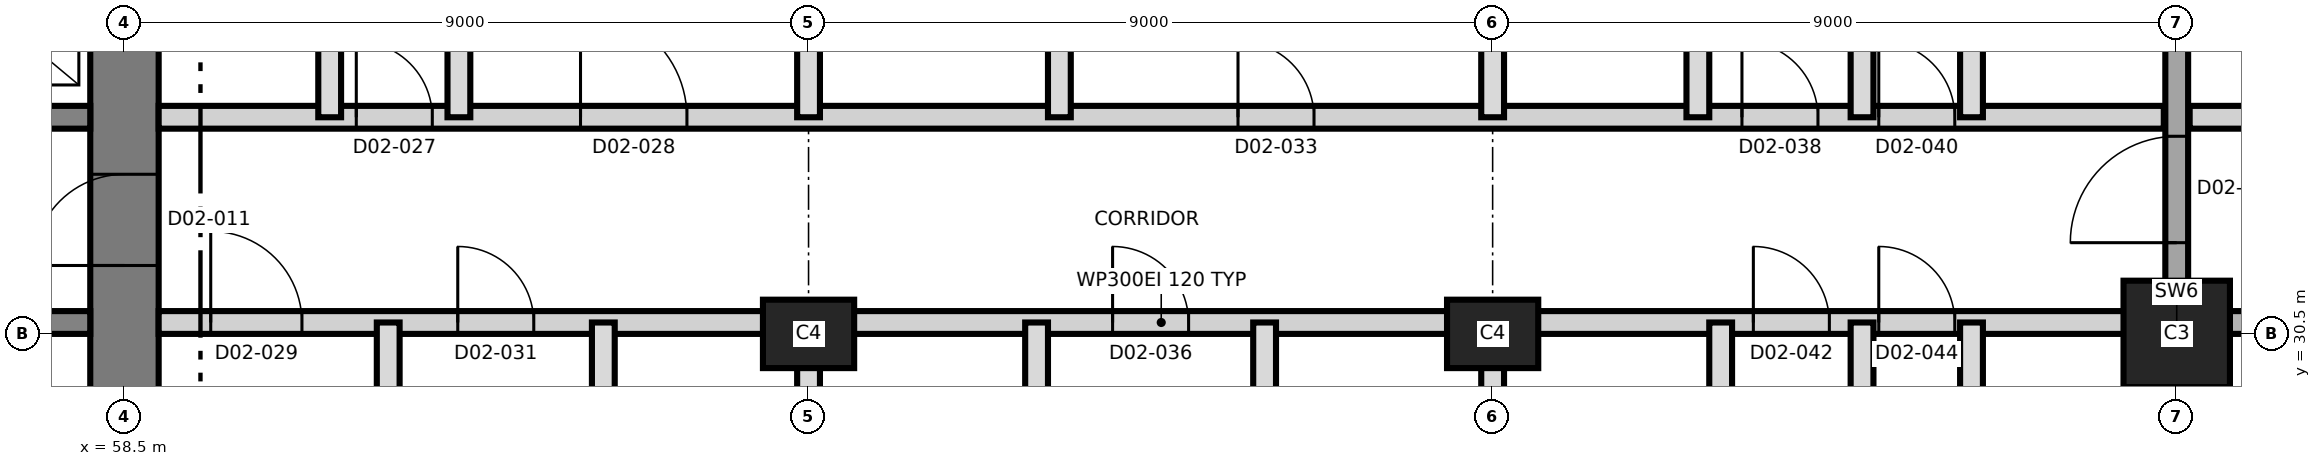
"""IFC4 building model, lengths in metres.
Left out: names, types, materials, properties, quantities, classifications, styles, units other than length and angle.
Written with IfcOpenShell. Run it as: python <this file> out.ifc"""

import sys

from ifc_helpers import new_model, si_unit, direction, frame, frame_2d, origin, origin_2d, place, context, subcontext, project, spatial, rectangle, extrude, element, fill, save


model = new_model("IFC4")
c1 = context("Model", 3, precision=1e-05, world=origin(), true_north=direction((0.0, 1.0)))
c2 = subcontext(c1, "Body", "Model", "MODEL_VIEW")
j1 = project(units=[si_unit("LENGTHUNIT", "METRE"), si_unit("PLANEANGLEUNIT", "RADIAN")], contexts=[c1])
p1 = place(None, origin())
s1 = spatial("IfcSite", under=j1, at=p1, CompositionType="ELEMENT")
p2 = place(p1, origin())
s2 = spatial("IfcBuilding", under=s1, at=p2, CompositionType="ELEMENT")
p3 = place(p2, frame((0.0, 0.0, 48.3)))
s3 = spatial("IfcBuildingStorey", under=s2, at=p3, CompositionType="ELEMENT", Elevation=48.3)
p4 = place(p3, frame((58.5, 21.05, 0.0), z_axis=(0.0, 0.0, 1.0), x_axis=(0.0, 1.0, 0.0)))
e1 = element("IfcWall", 1, at=p4, inside=s3, PredefinedType="SHEAR", context=c2, shape_type="SweptSolid", body=[
    extrude(rectangle(XDim=18.9, YDim=0.9, at=frame_2d((9.45, 0.0))), origin(), (0.0, 0.0, 1.0), 3.7),
])
p5 = place(p4, frame((10.35, 0.0, 0.0)))
e2 = element("IfcOpeningElement", 2, at=p5, cuts=e1, PredefinedType="OPENING", context=c2, shape_type="SweptSolid", body=[
    extrude(rectangle(XDim=1.2, YDim=2.1, at=frame_2d((0.6, 1.05))), frame((0.0, 0.46, 0.0), z_axis=(0.0, -1.0, 0.0), x_axis=(1.0, 0.0, 0.0)), (0.0, 0.0, 1.0), 0.92),
])
p6 = place(p3, frame((31.95, 30.65, 0.0), z_axis=(0.0, 0.0, 1.0), x_axis=(1.0, 0.0, 0.0)))
e3 = element("IfcWall", 3, at=p6, inside=s3, PredefinedType="SHEAR", context=c2, shape_type="SweptSolid", body=[
    extrude(rectangle(XDim=26.1, YDim=0.3, at=frame_2d((13.05, 0.0))), origin(), (0.0, 0.0, 1.0), 3.7),
])
p7 = place(p6, frame((24.55, 0.0, 0.0)))
e4 = element("IfcOpeningElement", 4, at=p7, cuts=e3, PredefinedType="OPENING", context=c2, shape_type="SweptSolid", body=[
    extrude(rectangle(XDim=1.0, YDim=2.1, at=frame_2d((0.5, 1.05))), frame((0.0, 0.16, 0.0), z_axis=(0.0, -1.0, 0.0), x_axis=(1.0, 0.0, 0.0)), (0.0, 0.0, 1.0), 0.32),
])
p8 = place(p6, frame((11.35, 0.0, 0.0)))
e5 = element("IfcOpeningElement", 5, at=p8, cuts=e3, PredefinedType="OPENING", context=c2, shape_type="SweptSolid", body=[
    extrude(rectangle(XDim=1.0, YDim=2.1, at=frame_2d((0.5, 1.05))), frame((0.0, 0.16, 0.0), z_axis=(0.0, -1.0, 0.0), x_axis=(1.0, 0.0, 0.0)), (0.0, 0.0, 1.0), 0.32),
])
p9 = place(p3, frame((31.95, 33.35, 0.0), z_axis=(0.0, 0.0, 1.0), x_axis=(1.0, 0.0, 0.0)))
e6 = element("IfcWall", 6, at=p9, inside=s3, PredefinedType="SHEAR", context=c2, shape_type="SweptSolid", body=[
    extrude(rectangle(XDim=26.1, YDim=0.3, at=frame_2d((13.05, 0.0))), origin(), (0.0, 0.0, 1.0), 3.7),
])
p10 = place(p9, frame((13.7, 0.0, 0.0)))
e7 = element("IfcOpeningElement", 7, at=p10, cuts=e6, PredefinedType="OPENING", context=c2, shape_type="SweptSolid", body=[
    extrude(rectangle(XDim=1.4, YDim=2.1, at=frame_2d((0.7, 1.05))), frame((0.0, 0.16, 0.0), z_axis=(0.0, -1.0, 0.0), x_axis=(1.0, 0.0, 0.0)), (0.0, 0.0, 1.0), 0.32),
])
p11 = place(p9, frame((5.175, 0.0, 0.0)))
e8 = element("IfcOpeningElement", 8, at=p11, cuts=e6, PredefinedType="OPENING", context=c2, shape_type="SweptSolid", body=[
    extrude(rectangle(XDim=1.2, YDim=2.1, at=frame_2d((0.6, 1.05))), frame((0.0, 0.16, 0.0), z_axis=(0.0, -1.0, 0.0), x_axis=(1.0, 0.0, 0.0)), (0.0, 0.0, 1.0), 0.32),
])
p12 = place(p9, frame((19.725, 0.0, 0.0)))
e9 = element("IfcOpeningElement", 9, at=p12, cuts=e6, PredefinedType="OPENING", context=c2, shape_type="SweptSolid", body=[
    extrude(rectangle(XDim=1.2, YDim=2.1, at=frame_2d((0.6, 1.05))), frame((0.0, 0.16, 0.0), z_axis=(0.0, -1.0, 0.0), x_axis=(1.0, 0.0, 0.0)), (0.0, 0.0, 1.0), 0.32),
])
for number, where, z_axis, x_axis in (
    (10, (67.5, 30.5, 0.0), (0.0, 0.0, 1.0), (1.0, 0.0, 0.0)),
    (11, (76.5, 30.5, 0.0), (0.0, 0.0, 1.0), (1.0, 0.0, 0.0)),
):
    element("IfcColumn", number, at=place(p3, frame(where, z_axis=z_axis, x_axis=x_axis)), inside=s3, PredefinedType="COLUMN", context=c2, shape_type="SweptSolid", body=[
        extrude(rectangle(XDim=1.2, YDim=0.9, at=origin_2d()), origin(), (0.0, 0.0, 1.0), 3.7),
    ])
p13 = place(p3, frame((85.5, 30.5, 0.0), z_axis=(0.0, 0.0, 1.0), x_axis=(1.0, 0.0, 0.0)))
e12 = element("IfcColumn", 12, at=p13, inside=s3, PredefinedType="COLUMN", context=c2, shape_type="SweptSolid", body=[
    extrude(rectangle(XDim=1.4, YDim=1.4, at=origin_2d()), origin(), (0.0, 0.0, 1.0), 3.7),
])
p14 = place(p3, frame((85.5, 20.565, 0.0), z_axis=(0.0, 0.0, 1.0), x_axis=(0.0, 1.0, 0.0)))
e13 = element("IfcWall", 13, at=p14, inside=s3, PredefinedType="SHEAR", context=c2, shape_type="SweptSolid", body=[
    extrude(rectangle(XDim=19.87, YDim=0.3, at=frame_2d((9.935, 0.0))), origin(), (0.0, 0.0, 1.0), 3.7),
])
p15 = place(p14, frame((11.135, 0.0, 0.0)))
e14 = element("IfcOpeningElement", 14, at=p15, cuts=e13, PredefinedType="OPENING", context=c2, shape_type="SweptSolid", body=[
    extrude(rectangle(XDim=1.4, YDim=2.1, at=frame_2d((0.7, 1.05))), frame((0.0, 0.16, 0.0), z_axis=(0.0, -1.0, 0.0), x_axis=(1.0, 0.0, 0.0)), (0.0, 0.0, 1.0), 0.32),
])
p16 = place(p3, frame((58.95, 30.65, 0.0), z_axis=(0.0, 0.0, 1.0), x_axis=(1.0, 0.0, 0.0)))
e15 = element("IfcWall", 15, at=p16, inside=s3, PredefinedType="PARTITIONING", context=c2, shape_type="SweptSolid", body=[
    extrude(rectangle(XDim=26.38, YDim=0.3, at=frame_2d((13.19, 0.0))), origin(), (0.0, 0.0, 1.0), 3.4),
])
p17 = place(p16, frame((0.685, 0.0, 0.0)))
e16 = element("IfcOpeningElement", 16, at=p17, cuts=e15, PredefinedType="OPENING", context=c2, shape_type="SweptSolid", body=[
    extrude(rectangle(XDim=1.2, YDim=2.1, at=frame_2d((0.6, 1.05))), frame((0.0, 0.16, 0.0), z_axis=(0.0, -1.0, 0.0), x_axis=(1.0, 0.0, 0.0)), (0.0, 0.0, 1.0), 0.32),
])
p18 = place(p16, frame((3.935, 0.0, 0.0)))
e17 = element("IfcOpeningElement", 17, at=p18, cuts=e15, PredefinedType="OPENING", context=c2, shape_type="SweptSolid", body=[
    extrude(rectangle(XDim=1.0, YDim=2.1, at=frame_2d((0.5, 1.05))), frame((0.0, 0.16, 0.0), z_axis=(0.0, -1.0, 0.0), x_axis=(1.0, 0.0, 0.0)), (0.0, 0.0, 1.0), 0.32),
])
p19 = place(p16, frame((12.55, 0.0, 0.0)))
e18 = element("IfcOpeningElement", 18, at=p19, cuts=e15, PredefinedType="OPENING", context=c2, shape_type="SweptSolid", body=[
    extrude(rectangle(XDim=1.0, YDim=2.4, at=frame_2d((0.5, 1.2))), frame((0.0, 0.16, 0.0), z_axis=(0.0, -1.0, 0.0), x_axis=(1.0, 0.0, 0.0)), (0.0, 0.0, 1.0), 0.32),
])
p20 = place(p16, frame((20.98, 0.0, 0.0)))
e19 = element("IfcOpeningElement", 19, at=p20, cuts=e15, PredefinedType="OPENING", context=c2, shape_type="SweptSolid", body=[
    extrude(rectangle(XDim=1.0, YDim=2.4, at=frame_2d((0.5, 1.2))), frame((0.0, 0.16, 0.0), z_axis=(0.0, -1.0, 0.0), x_axis=(1.0, 0.0, 0.0)), (0.0, 0.0, 1.0), 0.32),
])
p21 = place(p16, frame((22.63, 0.0, 0.0)))
e20 = element("IfcOpeningElement", 20, at=p21, cuts=e15, PredefinedType="OPENING", context=c2, shape_type="SweptSolid", body=[
    extrude(rectangle(XDim=1.0, YDim=2.4, at=frame_2d((0.5, 1.2))), frame((0.0, 0.16, 0.0), z_axis=(0.0, -1.0, 0.0), x_axis=(1.0, 0.0, 0.0)), (0.0, 0.0, 1.0), 0.32),
])
p22 = place(p3, frame((85.67, 30.65, 0.0), z_axis=(0.0, 0.0, 1.0), x_axis=(1.0, 0.0, 0.0)))
e21 = element("IfcWall", 21, at=p22, inside=s3, PredefinedType="SHEAR", context=c2, shape_type="SweptSolid", body=[
    extrude(rectangle(XDim=9.58, YDim=0.3, at=frame_2d((4.79, 0.0))), origin(), (0.0, 0.0, 1.0), 3.4),
])
p23 = place(p22, frame((2.08, 0.0, 0.0)))
e22 = element("IfcOpeningElement", 22, at=p23, cuts=e21, PredefinedType="OPENING", context=c2, shape_type="SweptSolid", body=[
    extrude(rectangle(XDim=1.2, YDim=2.1, at=frame_2d((0.6, 1.05))), frame((0.0, 0.16, 0.0), z_axis=(0.0, -1.0, 0.0), x_axis=(1.0, 0.0, 0.0)), (0.0, 0.0, 1.0), 0.32),
])
p24 = place(p22, frame((5.63, 0.0, 0.0)))
e23 = element("IfcOpeningElement", 23, at=p24, cuts=e21, PredefinedType="OPENING", context=c2, shape_type="SweptSolid", body=[
    extrude(rectangle(XDim=1.0, YDim=2.1, at=frame_2d((0.5, 1.05))), frame((0.0, 0.16, 0.0), z_axis=(0.0, -1.0, 0.0), x_axis=(1.0, 0.0, 0.0)), (0.0, 0.0, 1.0), 0.32),
])
p25 = place(p3, frame((58.95, 33.35, 0.0), z_axis=(0.0, 0.0, 1.0), x_axis=(1.0, 0.0, 0.0)))
e24 = element("IfcWall", 24, at=p25, inside=s3, PredefinedType="PARTITIONING", context=c2, shape_type="SweptSolid", body=[
    extrude(rectangle(XDim=26.38, YDim=0.3, at=frame_2d((13.19, 0.0))), origin(), (0.0, 0.0, 1.0), 3.4),
])
p26 = place(p25, frame((2.6, 0.0, 0.0)))
e25 = element("IfcOpeningElement", 25, at=p26, cuts=e24, PredefinedType="OPENING", context=c2, shape_type="SweptSolid", body=[
    extrude(rectangle(XDim=1.0, YDim=2.1, at=frame_2d((0.5, 1.05))), frame((0.0, 0.16, 0.0), z_axis=(0.0, -1.0, 0.0), x_axis=(1.0, 0.0, 0.0)), (0.0, 0.0, 1.0), 0.32),
])
p27 = place(p25, frame((5.55, 0.0, 0.0)))
e26 = element("IfcOpeningElement", 26, at=p27, cuts=e24, PredefinedType="OPENING", context=c2, shape_type="SweptSolid", body=[
    extrude(rectangle(XDim=1.4, YDim=2.1, at=frame_2d((0.7, 1.05))), frame((0.0, 0.16, 0.0), z_axis=(0.0, -1.0, 0.0), x_axis=(1.0, 0.0, 0.0)), (0.0, 0.0, 1.0), 0.32),
])
p28 = place(p25, frame((14.2, 0.0, 0.0)))
e27 = element("IfcOpeningElement", 27, at=p28, cuts=e24, PredefinedType="OPENING", context=c2, shape_type="SweptSolid", body=[
    extrude(rectangle(XDim=1.0, YDim=2.4, at=frame_2d((0.5, 1.2))), frame((0.0, 0.16, 0.0), z_axis=(0.0, -1.0, 0.0), x_axis=(1.0, 0.0, 0.0)), (0.0, 0.0, 1.0), 0.32),
])
p29 = place(p25, frame((20.83, 0.0, 0.0)))
e28 = element("IfcOpeningElement", 28, at=p29, cuts=e24, PredefinedType="OPENING", context=c2, shape_type="SweptSolid", body=[
    extrude(rectangle(XDim=1.0, YDim=2.1, at=frame_2d((0.5, 1.05))), frame((0.0, 0.16, 0.0), z_axis=(0.0, -1.0, 0.0), x_axis=(1.0, 0.0, 0.0)), (0.0, 0.0, 1.0), 0.32),
])
p30 = place(p25, frame((22.63, 0.0, 0.0)))
e29 = element("IfcOpeningElement", 29, at=p30, cuts=e24, PredefinedType="OPENING", context=c2, shape_type="SweptSolid", body=[
    extrude(rectangle(XDim=1.0, YDim=2.1, at=frame_2d((0.5, 1.05))), frame((0.0, 0.16, 0.0), z_axis=(0.0, -1.0, 0.0), x_axis=(1.0, 0.0, 0.0)), (0.0, 0.0, 1.0), 0.32),
])
p31 = place(p3, frame((85.67, 33.35, 0.0), z_axis=(0.0, 0.0, 1.0), x_axis=(1.0, 0.0, 0.0)))
e30 = element("IfcWall", 30, at=p31, inside=s3, PredefinedType="PARTITIONING", context=c2, shape_type="SweptSolid", body=[
    extrude(rectangle(XDim=9.58, YDim=0.3, at=frame_2d((4.79, 0.0))), origin(), (0.0, 0.0, 1.0), 3.4),
])
p32 = place(p31, frame((1.83, 0.0, 0.0)))
e31 = element("IfcOpeningElement", 31, at=p32, cuts=e30, PredefinedType="OPENING", context=c2, shape_type="SweptSolid", body=[
    extrude(rectangle(XDim=1.0, YDim=2.1, at=frame_2d((0.5, 1.05))), frame((0.0, 0.16, 0.0), z_axis=(0.0, -1.0, 0.0), x_axis=(1.0, 0.0, 0.0)), (0.0, 0.0, 1.0), 0.32),
])
p33 = place(p31, frame((5.63, 0.0, 0.0)))
e32 = element("IfcOpeningElement", 32, at=p33, cuts=e30, PredefinedType="OPENING", context=c2, shape_type="SweptSolid", body=[
    extrude(rectangle(XDim=1.0, YDim=2.1, at=frame_2d((0.5, 1.05))), frame((0.0, 0.16, 0.0), z_axis=(0.0, -1.0, 0.0), x_axis=(1.0, 0.0, 0.0)), (0.0, 0.0, 1.0), 0.32),
])
p34 = place(p3, frame((61.2, 33.35, 0.0), z_axis=(0.0, 0.0, 1.0), x_axis=(0.0, 1.0, 0.0)))
e33 = element("IfcWall", 33, at=p34, inside=s3, PredefinedType="PARTITIONING", context=c2, shape_type="SweptSolid", body=[
    extrude(rectangle(XDim=3.2, YDim=0.3, at=frame_2d((1.6, 0.0))), origin(), (0.0, 0.0, 1.0), 3.4),
])
p35 = place(p3, frame((61.97, 20.565, 0.0), z_axis=(0.0, 0.0, 1.0), x_axis=(0.0, 1.0, 0.0)))
e34 = element("IfcWall", 34, at=p35, inside=s3, PredefinedType="PARTITIONING", context=c2, shape_type="SweptSolid", body=[
    extrude(rectangle(XDim=10.085, YDim=0.3, at=frame_2d((5.042, 0.0))), origin(), (0.0, 0.0, 1.0), 3.4),
])
p36 = place(p3, frame((62.9, 33.35, 0.0), z_axis=(0.0, 0.0, 1.0), x_axis=(0.0, 1.0, 0.0)))
e35 = element("IfcWall", 35, at=p36, inside=s3, PredefinedType="PARTITIONING", context=c2, shape_type="SweptSolid", body=[
    extrude(rectangle(XDim=7.265, YDim=0.3, at=frame_2d((3.632, 0.0))), origin(), (0.0, 0.0, 1.0), 3.4),
])
p37 = place(p3, frame((64.8, 27.45, 0.0), z_axis=(0.0, 0.0, 1.0), x_axis=(0.0, 1.0, 0.0)))
e36 = element("IfcWall", 36, at=p37, inside=s3, PredefinedType="PARTITIONING", context=c2, shape_type="SweptSolid", body=[
    extrude(rectangle(XDim=3.2, YDim=0.3, at=frame_2d((1.6, 0.0))), origin(), (0.0, 0.0, 1.0), 3.4),
])
p38 = place(p3, frame((67.5, 20.565, 0.0), z_axis=(0.0, 0.0, 1.0), x_axis=(0.0, 1.0, 0.0)))
e37 = element("IfcWall", 37, at=p38, inside=s3, PredefinedType="PARTITIONING", context=c2, shape_type="SweptSolid", body=[
    extrude(rectangle(XDim=10.085, YDim=0.3, at=frame_2d((5.042, 0.0))), origin(), (0.0, 0.0, 1.0), 3.4),
])
p39 = place(p3, frame((67.5, 33.35, 0.0), z_axis=(0.0, 0.0, 1.0), x_axis=(0.0, 1.0, 0.0)))
e38 = element("IfcWall", 38, at=p39, inside=s3, PredefinedType="PARTITIONING", context=c2, shape_type="SweptSolid", body=[
    extrude(rectangle(XDim=7.265, YDim=0.3, at=frame_2d((3.632, 0.0))), origin(), (0.0, 0.0, 1.0), 3.4),
])
p40 = place(p3, frame((70.5, 27.35, 0.0), z_axis=(0.0, 0.0, 1.0), x_axis=(0.0, 1.0, 0.0)))
e39 = element("IfcWall", 39, at=p40, inside=s3, PredefinedType="PARTITIONING", context=c2, shape_type="SweptSolid", body=[
    extrude(rectangle(XDim=3.3, YDim=0.3, at=frame_2d((1.65, 0.0))), origin(), (0.0, 0.0, 1.0), 3.4),
])
p41 = place(p3, frame((70.8, 33.35, 0.0), z_axis=(0.0, 0.0, 1.0), x_axis=(0.0, 1.0, 0.0)))
e40 = element("IfcWall", 40, at=p41, inside=s3, PredefinedType="PARTITIONING", context=c2, shape_type="SweptSolid", body=[
    extrude(rectangle(XDim=3.5, YDim=0.3, at=frame_2d((1.75, 0.0))), origin(), (0.0, 0.0, 1.0), 3.4),
])
p42 = place(p3, frame((73.5, 27.35, 0.0), z_axis=(0.0, 0.0, 1.0), x_axis=(0.0, 1.0, 0.0)))
e41 = element("IfcWall", 41, at=p42, inside=s3, PredefinedType="PARTITIONING", context=c2, shape_type="SweptSolid", body=[
    extrude(rectangle(XDim=3.3, YDim=0.3, at=frame_2d((1.65, 0.0))), origin(), (0.0, 0.0, 1.0), 3.4),
])
p43 = place(p3, frame((76.5, 20.565, 0.0), z_axis=(0.0, 0.0, 1.0), x_axis=(0.0, 1.0, 0.0)))
e42 = element("IfcWall", 42, at=p43, inside=s3, PredefinedType="PARTITIONING", context=c2, shape_type="SweptSolid", body=[
    extrude(rectangle(XDim=10.085, YDim=0.3, at=frame_2d((5.042, 0.0))), origin(), (0.0, 0.0, 1.0), 3.4),
])
p44 = place(p3, frame((76.5, 33.35, 0.0), z_axis=(0.0, 0.0, 1.0), x_axis=(0.0, 1.0, 0.0)))
e43 = element("IfcWall", 43, at=p44, inside=s3, PredefinedType="PARTITIONING", context=c2, shape_type="SweptSolid", body=[
    extrude(rectangle(XDim=7.265, YDim=0.3, at=frame_2d((3.632, 0.0))), origin(), (0.0, 0.0, 1.0), 3.4),
])
p45 = place(p3, frame((79.2, 33.35, 0.0), z_axis=(0.0, 0.0, 1.0), x_axis=(0.0, 1.0, 0.0)))
e44 = element("IfcWall", 44, at=p45, inside=s3, PredefinedType="PARTITIONING", context=c2, shape_type="SweptSolid", body=[
    extrude(rectangle(XDim=3.2, YDim=0.3, at=frame_2d((1.6, 0.0))), origin(), (0.0, 0.0, 1.0), 3.4),
])
p46 = place(p3, frame((79.5, 27.35, 0.0), z_axis=(0.0, 0.0, 1.0), x_axis=(0.0, 1.0, 0.0)))
e45 = element("IfcWall", 45, at=p46, inside=s3, PredefinedType="PARTITIONING", context=c2, shape_type="SweptSolid", body=[
    extrude(rectangle(XDim=3.3, YDim=0.3, at=frame_2d((1.65, 0.0))), origin(), (0.0, 0.0, 1.0), 3.4),
])
p47 = place(p3, frame((81.36, 20.565, 0.0), z_axis=(0.0, 0.0, 1.0), x_axis=(0.0, 1.0, 0.0)))
e46 = element("IfcWall", 46, at=p47, inside=s3, PredefinedType="PARTITIONING", context=c2, shape_type="SweptSolid", body=[
    extrude(rectangle(XDim=10.085, YDim=0.3, at=frame_2d((5.042, 0.0))), origin(), (0.0, 0.0, 1.0), 3.4),
])
p48 = place(p3, frame((81.36, 33.35, 0.0), z_axis=(0.0, 0.0, 1.0), x_axis=(0.0, 1.0, 0.0)))
e47 = element("IfcWall", 47, at=p48, inside=s3, PredefinedType="PARTITIONING", context=c2, shape_type="SweptSolid", body=[
    extrude(rectangle(XDim=7.265, YDim=0.3, at=frame_2d((3.632, 0.0))), origin(), (0.0, 0.0, 1.0), 3.4),
])
p49 = place(p3, frame((82.8, 27.35, 0.0), z_axis=(0.0, 0.0, 1.0), x_axis=(0.0, 1.0, 0.0)))
e48 = element("IfcWall", 48, at=p49, inside=s3, PredefinedType="PARTITIONING", context=c2, shape_type="SweptSolid", body=[
    extrude(rectangle(XDim=3.3, YDim=0.3, at=frame_2d((1.65, 0.0))), origin(), (0.0, 0.0, 1.0), 3.4),
])
p50 = place(p3, frame((82.8, 33.35, 0.0), z_axis=(0.0, 0.0, 1.0), x_axis=(0.0, 1.0, 0.0)))
e49 = element("IfcWall", 49, at=p50, inside=s3, PredefinedType="PARTITIONING", context=c2, shape_type="SweptSolid", body=[
    extrude(rectangle(XDim=3.2, YDim=0.3, at=frame_2d((1.6, 0.0))), origin(), (0.0, 0.0, 1.0), 3.4),
])
p51 = place(p5, origin())
e50 = element("IfcDoor", 50, at=p51, inside=s3, OperationType="SINGLE_SWING_LEFT", PredefinedType="DOOR", context=c2, shape_type="SweptSolid", body=[
    extrude(rectangle(XDim=1.2, YDim=2.1, at=frame_2d((0.6, 1.05))), frame((0.0, 0.025, 0.0), z_axis=(0.0, -1.0, 0.0), x_axis=(1.0, 0.0, 0.0)), (0.0, 0.0, 1.0), 0.05),
])
fill(e2, e50)
p52 = place(p26, origin())
e51 = element("IfcDoor", 51, at=p52, inside=s3, OperationType="SINGLE_SWING_LEFT", PredefinedType="DOOR", context=c2, shape_type="SweptSolid", body=[
    extrude(rectangle(XDim=1.0, YDim=2.1, at=frame_2d((0.5, 1.05))), frame((0.0, 0.025, 0.0), z_axis=(0.0, -1.0, 0.0), x_axis=(1.0, 0.0, 0.0)), (0.0, 0.0, 1.0), 0.05),
])
fill(e25, e51)
p53 = place(p27, origin())
e52 = element("IfcDoor", 52, at=p53, inside=s3, OperationType="SINGLE_SWING_RIGHT", PredefinedType="DOOR", context=c2, shape_type="SweptSolid", body=[
    extrude(rectangle(XDim=1.4, YDim=2.1, at=frame_2d((0.7, 1.05))), frame((0.0, 0.025, 0.0), z_axis=(0.0, -1.0, 0.0), x_axis=(1.0, 0.0, 0.0)), (0.0, 0.0, 1.0), 0.05),
])
fill(e26, e52)
p54 = place(p17, origin())
e53 = element("IfcDoor", 53, at=p54, inside=s3, OperationType="SINGLE_SWING_LEFT", PredefinedType="DOOR", context=c2, shape_type="SweptSolid", body=[
    extrude(rectangle(XDim=1.2, YDim=2.1, at=frame_2d((0.6, 1.05))), frame((0.0, 0.025, 0.0), z_axis=(0.0, -1.0, 0.0), x_axis=(1.0, 0.0, 0.0)), (0.0, 0.0, 1.0), 0.05),
])
fill(e16, e53)
p55 = place(p18, origin())
e54 = element("IfcDoor", 54, at=p55, inside=s3, OperationType="SINGLE_SWING_LEFT", PredefinedType="DOOR", context=c2, shape_type="SweptSolid", body=[
    extrude(rectangle(XDim=1.0, YDim=2.1, at=frame_2d((0.5, 1.05))), frame((0.0, 0.025, 0.0), z_axis=(0.0, -1.0, 0.0), x_axis=(1.0, 0.0, 0.0)), (0.0, 0.0, 1.0), 0.05),
])
fill(e17, e54)
p56 = place(p28, origin())
e55 = element("IfcDoor", 55, at=p56, inside=s3, OperationType="SINGLE_SWING_LEFT", PredefinedType="DOOR", context=c2, shape_type="SweptSolid", body=[
    extrude(rectangle(XDim=1.0, YDim=2.4, at=frame_2d((0.5, 1.2))), frame((0.0, 0.025, 0.0), z_axis=(0.0, -1.0, 0.0), x_axis=(1.0, 0.0, 0.0)), (0.0, 0.0, 1.0), 0.05),
])
fill(e27, e55)
p57 = place(p19, origin())
e56 = element("IfcDoor", 56, at=p57, inside=s3, OperationType="SINGLE_SWING_RIGHT", PredefinedType="DOOR", context=c2, shape_type="SweptSolid", body=[
    extrude(rectangle(XDim=1.0, YDim=2.4, at=frame_2d((0.5, 1.2))), frame((0.0, 0.025, 0.0), z_axis=(0.0, -1.0, 0.0), x_axis=(1.0, 0.0, 0.0)), (0.0, 0.0, 1.0), 0.05),
])
fill(e18, e56)
p58 = place(p29, origin())
e57 = element("IfcDoor", 57, at=p58, inside=s3, OperationType="SINGLE_SWING_RIGHT", PredefinedType="DOOR", context=c2, shape_type="SweptSolid", body=[
    extrude(rectangle(XDim=1.0, YDim=2.1, at=frame_2d((0.5, 1.05))), frame((0.0, 0.025, 0.0), z_axis=(0.0, -1.0, 0.0), x_axis=(1.0, 0.0, 0.0)), (0.0, 0.0, 1.0), 0.05),
])
fill(e28, e57)
p59 = place(p30, origin())
e58 = element("IfcDoor", 58, at=p59, inside=s3, OperationType="SINGLE_SWING_LEFT", PredefinedType="DOOR", context=c2, shape_type="SweptSolid", body=[
    extrude(rectangle(XDim=1.0, YDim=2.1, at=frame_2d((0.5, 1.05))), frame((0.0, 0.025, 0.0), z_axis=(0.0, -1.0, 0.0), x_axis=(1.0, 0.0, 0.0)), (0.0, 0.0, 1.0), 0.05),
])
fill(e29, e58)
p60 = place(p20, origin())
e59 = element("IfcDoor", 59, at=p60, inside=s3, OperationType="SINGLE_SWING_LEFT", PredefinedType="DOOR", context=c2, shape_type="SweptSolid", body=[
    extrude(rectangle(XDim=1.0, YDim=2.4, at=frame_2d((0.5, 1.2))), frame((0.0, 0.025, 0.0), z_axis=(0.0, -1.0, 0.0), x_axis=(1.0, 0.0, 0.0)), (0.0, 0.0, 1.0), 0.05),
])
fill(e19, e59)
p61 = place(p21, origin())
e60 = element("IfcDoor", 60, at=p61, inside=s3, OperationType="SINGLE_SWING_RIGHT", PredefinedType="DOOR", context=c2, shape_type="SweptSolid", body=[
    extrude(rectangle(XDim=1.0, YDim=2.4, at=frame_2d((0.5, 1.2))), frame((0.0, 0.025, 0.0), z_axis=(0.0, -1.0, 0.0), x_axis=(1.0, 0.0, 0.0)), (0.0, 0.0, 1.0), 0.05),
])
fill(e20, e60)
p62 = place(p15, origin())
e61 = element("IfcDoor", 61, at=p62, inside=s3, OperationType="SINGLE_SWING_RIGHT", PredefinedType="DOOR", context=c2, shape_type="SweptSolid", body=[
    extrude(rectangle(XDim=1.4, YDim=2.1, at=frame_2d((0.7, 1.05))), frame((0.0, 0.025, 0.0), z_axis=(0.0, -1.0, 0.0), x_axis=(1.0, 0.0, 0.0)), (0.0, 0.0, 1.0), 0.05),
])
fill(e14, e61)
save(model, sys.argv[1])
